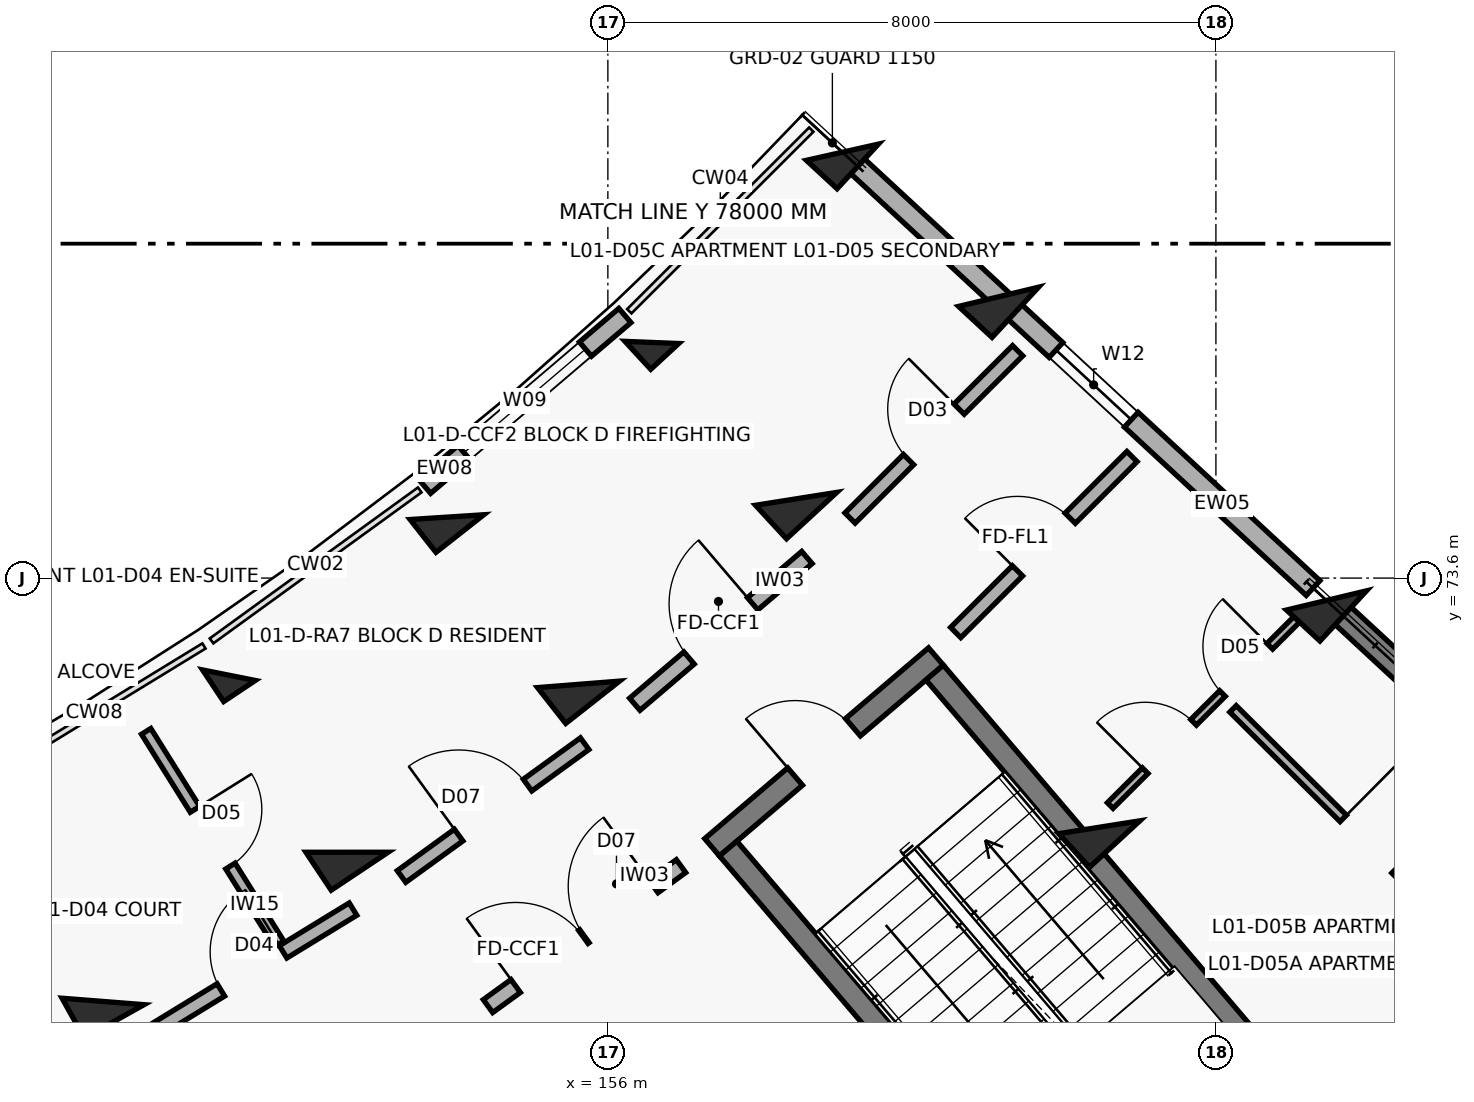
"""IFC4 building model, lengths in metres.
Left out: names, types, materials, properties, quantities, classifications, styles, units other than length and angle.
Written with IfcOpenShell. Run it as: python <this file> out.ifc"""

import sys

from ifc_helpers import new_model, si_unit, direction, frame, frame_2d, origin, origin_2d, place, context, subcontext, project, spatial, rectangle, extrude, element, fill, save


model = new_model("IFC4")
c1 = context("Model", 3, precision=1e-05, world=origin(), true_north=direction((0.0, 1.0)))
c2 = subcontext(c1, "Body", "Model", "MODEL_VIEW")
j1 = project(units=[si_unit("LENGTHUNIT", "METRE"), si_unit("PLANEANGLEUNIT", "RADIAN")], contexts=[c1])
p1 = place(None, origin())
s1 = spatial("IfcSite", under=j1, at=p1, CompositionType="ELEMENT")
p2 = place(p1, origin())
s2 = spatial("IfcBuilding", under=s1, at=p2, CompositionType="ELEMENT")
p3 = place(p2, frame((0.0, 0.0, 4.5)))
s3 = spatial("IfcBuildingStorey", under=s2, at=p3, CompositionType="ELEMENT", Elevation=4.5)
p4 = place(p3, frame((149.358, 68.03, 0.0), z_axis=(0.0, 0.0, 1.0), x_axis=(0.487859659139, -0.87292207727, 0.0)))
e1 = element("IfcColumn", 1, at=p4, inside=s3, PredefinedType="COLUMN", context=c2, shape_type="SweptSolid", body=[
    extrude(rectangle(XDim=0.6, YDim=0.9, at=origin_2d()), origin(), (0.0, 0.0, 1.0), 3.6),
])
p5 = place(p3, frame((151.015, 72.322, 0.0), z_axis=(0.0, 0.0, 1.0), x_axis=(0.554844427448, -0.83195412213, 0.0)))
e2 = element("IfcColumn", 2, at=p5, inside=s3, PredefinedType="COLUMN", context=c2, shape_type="SweptSolid", body=[
    extrude(rectangle(XDim=0.5, YDim=0.5, at=origin_2d()), origin(), (0.0, 0.0, 1.0), 3.6),
])
p6 = place(p3, frame((152.568, 69.993, 0.0), z_axis=(0.0, 0.0, 1.0), x_axis=(0.554844427448, -0.83195412213, 0.0)))
e3 = element("IfcColumn", 3, at=p6, inside=s3, PredefinedType="COLUMN", context=c2, shape_type="SweptSolid", body=[
    extrude(rectangle(XDim=0.6, YDim=0.9, at=origin_2d()), origin(), (0.0, 0.0, 1.0), 3.6),
])
p7 = place(p3, frame((153.883, 74.402, 0.0), z_axis=(0.0, 0.0, 1.0), x_axis=(0.618408395358, -0.785856893175, 0.0)))
e4 = element("IfcColumn", 4, at=p7, inside=s3, PredefinedType="COLUMN", context=c2, shape_type="SweptSolid", body=[
    extrude(rectangle(XDim=0.55, YDim=0.8, at=origin_2d()), origin(), (0.0, 0.0, 1.0), 3.6),
])
for number, where, z_axis, x_axis in (
    (5, (155.614, 72.202, 0.0), (0.0, 0.0, 1.0), (0.618, -0.786, 0.0)),
    (6, (159.25, 67.581, 0.0), (0.0, 0.0, 1.0), (0.618, -0.786, 0.0)),
):
    element("IfcColumn", number, at=place(p3, frame(where, z_axis=z_axis, x_axis=x_axis)), inside=s3, PredefinedType="COLUMN", context=c2, shape_type="SweptSolid", body=[
        extrude(rectangle(XDim=0.6, YDim=0.9, at=origin_2d()), origin(), (0.0, 0.0, 1.0), 3.6),
    ])
p8 = place(p3, frame((156.579, 76.701, 0.0), z_axis=(0.0, 0.0, 1.0), x_axis=(0.678159669868, -0.73491459515, 0.0)))
e7 = element("IfcColumn", 7, at=p8, inside=s3, PredefinedType="COLUMN", context=c2, shape_type="SweptSolid", body=[
    extrude(rectangle(XDim=0.5, YDim=0.5, at=origin_2d()), origin(), (0.0, 0.0, 1.0), 3.6),
])
for number, where, z_axis, x_axis in (
    (8, (158.477, 74.643, 0.0), (0.0, 0.0, 1.0), (0.678, -0.735, 0.0)),
    (9, (162.465, 70.322, 0.0), (0.0, 0.0, 1.0), (0.678, -0.735, 0.0)),
):
    element("IfcColumn", number, at=place(p3, frame(where, z_axis=z_axis, x_axis=x_axis)), inside=s3, PredefinedType="COLUMN", context=c2, shape_type="SweptSolid", body=[
        extrude(rectangle(XDim=0.6, YDim=0.9, at=origin_2d()), origin(), (0.0, 0.0, 1.0), 3.6),
    ])
p9 = place(p3, frame((159.086, 79.204, 0.0), z_axis=(0.0, 0.0, 1.0), x_axis=(0.733729864503, -0.679441304262, 0.0)))
e10 = element("IfcColumn", 10, at=p9, inside=s3, PredefinedType="COLUMN", context=c2, shape_type="SweptSolid", body=[
    extrude(rectangle(XDim=0.55, YDim=0.8, at=origin_2d()), origin(), (0.0, 0.0, 1.0), 3.6),
])
for number, where, z_axis, x_axis in (
    (11, (161.14, 77.301, 0.0), (0.0, 0.0, 1.0), (0.734, -0.679, 0.0)),
    (12, (165.455, 73.306, 0.0), (0.0, 0.0, 1.0), (0.734, -0.679, 0.0)),
):
    element("IfcColumn", number, at=place(p3, frame(where, z_axis=z_axis, x_axis=x_axis)), inside=s3, PredefinedType="COLUMN", context=c2, shape_type="SweptSolid", body=[
        extrude(rectangle(XDim=0.6, YDim=0.9, at=origin_2d()), origin(), (0.0, 0.0, 1.0), 3.6),
    ])
p10 = place(p3, frame((165.587, 73.184, 0.0), z_axis=(0.0, 0.0, 1.0), x_axis=(0.733739663667, -0.679430721974, 0.0)))
e13 = element("IfcWall", 13, at=p10, inside=s3, PredefinedType="SHEAR", context=c2, shape_type="SweptSolid", body=[
    extrude(rectangle(XDim=4.72, YDim=0.31, at=frame_2d((2.36, 0.0))), origin(), (0.0, 0.0, 1.0), 3.36),
])
p11 = place(p3, frame((153.589, 74.808, 0.0), z_axis=(0.0, 0.0, 1.0), x_axis=(0.760985425115, 0.648768974876, 0.0)))
e14 = element("IfcWall", 14, at=p11, inside=s3, PredefinedType="SOLIDWALL", context=c2, shape_type="SweptSolid", body=[
    extrude(rectangle(XDim=3.464, YDim=0.245, at=frame_2d((1.732, 0.0))), origin(), (0.0, 0.0, 1.0), 2.6),
])
p12 = place(p11, frame((0.682, 0.0, 0.32)))
e15 = element("IfcOpeningElement", 15, at=p12, cuts=e14, PredefinedType="OPENING", context=c2, shape_type="SweptSolid", body=[
    extrude(rectangle(XDim=2.1, YDim=1.65, at=frame_2d((1.05, 0.825))), frame((0.0, 0.133, 0.0), z_axis=(0.0, -1.0, 0.0), x_axis=(1.0, 0.0, 0.0)), (0.0, 0.0, 1.0), 0.265),
])
p13 = place(p3, frame((159.262, 79.041, 0.0), z_axis=(0.0, 0.0, 1.0), x_axis=(0.733738684326, -0.679431779595, 0.0)))
e16 = element("IfcWall", 16, at=p13, inside=s3, PredefinedType="SOLIDWALL", context=c2, shape_type="SweptSolid", body=[
    extrude(rectangle(XDim=8.2, YDim=0.265, at=frame_2d((4.1, 0.0))), origin(), (0.0, 0.0, 1.0), 2.58),
])
p14 = place(p13, frame((3.59, 0.0, 0.75)))
e17 = element("IfcOpeningElement", 17, at=p14, cuts=e16, PredefinedType="OPENING", context=c2, shape_type="SweptSolid", body=[
    extrude(rectangle(XDim=1.35, YDim=1.35, at=frame_2d((0.675, 0.675))), frame((0.0, 0.142, 0.0), z_axis=(0.0, -1.0, 0.0), x_axis=(1.0, 0.0, 0.0)), (0.0, 0.0, 1.0), 0.285),
])
p15 = place(p3, frame((157.372, 70.058, 0.0), z_axis=(0.0, 0.0, 1.0), x_axis=(0.760990583254, 0.648762924495, 0.0)))
e18 = element("IfcWall", 18, at=p15, inside=s3, PredefinedType="SHEAR", context=c2, shape_type="SweptSolid", body=[
    extrude(rectangle(XDim=3.87, YDim=0.3, at=frame_2d((1.935, 0.0))), origin(), (0.0, 0.0, 1.0), 3.6),
])
p16 = place(p15, frame((1.435, 0.0, 0.0)))
e19 = element("IfcOpeningElement", 19, at=p16, cuts=e18, PredefinedType="OPENING", context=c2, shape_type="SweptSolid", body=[
    extrude(rectangle(XDim=1.0, YDim=2.15, at=frame_2d((0.5, 1.075))), frame((0.0, 0.16, 0.0), z_axis=(0.0, -1.0, 0.0), x_axis=(1.0, 0.0, 0.0)), (0.0, 0.0, 1.0), 0.32),
])
p17 = place(p3, frame((157.583, 70.041, 0.0), z_axis=(0.0, 0.0, 1.0), x_axis=(0.648762810187, -0.760990680704, 0.0)))
e20 = element("IfcWall", 20, at=p17, inside=s3, PredefinedType="SHEAR", context=c2, shape_type="SweptSolid", body=[
    extrude(rectangle(XDim=7.69, YDim=0.3, at=frame_2d((3.845, 0.0))), origin(), (0.0, 0.0, 1.0), 3.6),
])
p18 = place(p3, frame((160.3, 72.357, 0.0), z_axis=(0.0, 0.0, 1.0), x_axis=(0.648781194888, -0.760975006922, 0.0)))
e21 = element("IfcWall", 21, at=p18, inside=s3, PredefinedType="SHEAR", context=c2, shape_type="SweptSolid", body=[
    extrude(rectangle(XDim=7.69, YDim=0.3, at=frame_2d((3.845, 0.0))), origin(), (0.0, 0.0, 1.0), 3.6),
])
p19 = place(p3, frame((149.989, 67.619, 0.0), z_axis=(0.0, 0.0, 1.0), x_axis=(0.853121049608, 0.5217130195, 0.0)))
e22 = element("IfcWall", 22, at=p19, inside=s3, PredefinedType="SOLIDWALL", context=c2, shape_type="SweptSolid", body=[
    extrude(rectangle(XDim=3.116, YDim=0.19, at=frame_2d((1.558, 0.0))), origin(), (0.0, 0.0, 1.0), 2.58),
])
p20 = place(p19, frame((1.078, 0.0, 0.0)))
e23 = element("IfcOpeningElement", 23, at=p20, cuts=e22, PredefinedType="OPENING", context=c2, shape_type="SweptSolid", body=[
    extrude(rectangle(XDim=0.96, YDim=2.1, at=frame_2d((0.48, 1.05))), frame((0.0, 0.105, 0.0), z_axis=(0.0, -1.0, 0.0), x_axis=(1.0, 0.0, 0.0)), (0.0, 0.0, 1.0), 0.21),
])
p21 = place(p3, frame((149.926, 71.583, 0.0), z_axis=(0.0, 0.0, 1.0), x_axis=(0.5303779416, -0.847761310196, 0.0)))
e24 = element("IfcWall", 24, at=p21, inside=s3, PredefinedType="PARTITIONING", context=c2, shape_type="SweptSolid", body=[
    extrude(rectangle(XDim=3.3, YDim=0.145, at=frame_2d((1.65, 0.0))), origin(), (0.0, 0.0, 1.0), 2.58),
])
p22 = place(p21, frame((1.21, 0.0, 0.0)))
e25 = element("IfcOpeningElement", 25, at=p22, cuts=e24, PredefinedType="OPENING", context=c2, shape_type="SweptSolid", body=[
    extrude(rectangle(XDim=0.88, YDim=2.1, at=frame_2d((0.44, 1.05))), frame((0.0, 0.083, 0.0), z_axis=(0.0, -1.0, 0.0), x_axis=(1.0, 0.0, 0.0)), (0.0, 0.0, 1.0), 0.165),
])
p23 = place(p3, frame((154.423, 67.968, 0.0), z_axis=(0.0, 0.0, 1.0), x_axis=(0.809516127005, 0.587097641043, 0.0)))
e26 = element("IfcWall", 26, at=p23, inside=s3, PredefinedType="SOLIDWALL", context=c2, shape_type="SweptSolid", body=[
    extrude(rectangle(XDim=3.137, YDim=0.21, at=frame_2d((1.569, 0.0))), origin(), (0.0, 0.0, 1.0), 2.58),
])
p24 = place(p23, frame((0.45, 0.0, 0.0)))
e27 = element("IfcOpeningElement", 27, at=p24, cuts=e26, PredefinedType="OPENING", context=c2, shape_type="SweptSolid", body=[
    extrude(rectangle(XDim=1.1, YDim=2.15, at=frame_2d((0.55, 1.075))), frame((0.0, 0.115, 0.0), z_axis=(0.0, -1.0, 0.0), x_axis=(1.0, 0.0, 0.0)), (0.0, 0.0, 1.0), 0.23),
])
p25 = place(p23, frame((1.567, 0.0, 0.0)))
e28 = element("IfcOpeningElement", 28, at=p25, cuts=e26, PredefinedType="OPENING", context=c2, shape_type="SweptSolid", body=[
    extrude(rectangle(XDim=1.12, YDim=2.15, at=frame_2d((0.56, 1.075))), frame((0.0, 0.115, 0.0), z_axis=(0.0, -1.0, 0.0), x_axis=(1.0, 0.0, 0.0)), (0.0, 0.0, 1.0), 0.23),
])
p26 = place(p3, frame((153.285, 69.674, 0.0), z_axis=(0.0, 0.0, 1.0), x_axis=(0.809505174959, 0.587112741911, 0.0)))
e29 = element("IfcWall", 29, at=p26, inside=s3, PredefinedType="SOLIDWALL", context=c2, shape_type="SweptSolid", body=[
    extrude(rectangle(XDim=2.976, YDim=0.19, at=frame_2d((1.488, 0.0))), origin(), (0.0, 0.0, 1.0), 2.58),
])
p27 = place(p26, frame((0.928, 0.0, 0.0)))
e30 = element("IfcOpeningElement", 30, at=p27, cuts=e29, PredefinedType="OPENING", context=c2, shape_type="SweptSolid", body=[
    extrude(rectangle(XDim=1.12, YDim=2.15, at=frame_2d((0.56, 1.075))), frame((0.0, 0.105, 0.0), z_axis=(0.0, -1.0, 0.0), x_axis=(1.0, 0.0, 0.0)), (0.0, 0.0, 1.0), 0.21),
])
p28 = place(p3, frame((156.354, 71.94, 0.0), z_axis=(0.0, 0.0, 1.0), x_axis=(0.760991187621, 0.648762215579, 0.0)))
e31 = element("IfcWall", 31, at=p28, inside=s3, PredefinedType="SOLIDWALL", context=c2, shape_type="SweptSolid", body=[
    extrude(rectangle(XDim=2.976, YDim=0.21, at=frame_2d((1.488, 0.0))), origin(), (0.0, 0.0, 1.0), 2.58),
])
p29 = place(p28, frame((0.938, 0.0, 0.0)))
e32 = element("IfcOpeningElement", 32, at=p29, cuts=e31, PredefinedType="OPENING", context=c2, shape_type="SweptSolid", body=[
    extrude(rectangle(XDim=1.1, YDim=2.15, at=frame_2d((0.55, 1.075))), frame((0.0, 0.115, 0.0), z_axis=(0.0, -1.0, 0.0), x_axis=(1.0, 0.0, 0.0)), (0.0, 0.0, 1.0), 0.23),
])
p30 = place(p3, frame((160.576, 72.884, 0.0), z_axis=(0.0, 0.0, 1.0), x_axis=(0.70773973846, 0.706473256822, 0.0)))
e33 = element("IfcWall", 33, at=p30, inside=s3, PredefinedType="SOLIDWALL", context=c2, shape_type="SweptSolid", body=[
    extrude(rectangle(XDim=3.277, YDim=0.19, at=frame_2d((1.639, 0.0))), origin(), (0.0, 0.0, 1.0), 2.58),
])
p31 = place(p30, frame((1.148, 0.0, 0.0)))
e34 = element("IfcOpeningElement", 34, at=p31, cuts=e33, PredefinedType="OPENING", context=c2, shape_type="SweptSolid", body=[
    extrude(rectangle(XDim=0.98, YDim=2.15, at=frame_2d((0.49, 1.075))), frame((0.0, 0.105, 0.0), z_axis=(0.0, -1.0, 0.0), x_axis=(1.0, 0.0, 0.0)), (0.0, 0.0, 1.0), 0.21),
])
p32 = place(p3, frame((159.186, 74.39, 0.0), z_axis=(0.0, 0.0, 1.0), x_axis=(0.70773330139, 0.706479705373, 0.0)))
e35 = element("IfcWall", 35, at=p32, inside=s3, PredefinedType="SOLIDWALL", context=c2, shape_type="SweptSolid", body=[
    extrude(rectangle(XDim=3.116, YDim=0.19, at=frame_2d((1.558, 0.0))), origin(), (0.0, 0.0, 1.0), 2.58),
])
p33 = place(p32, frame((1.088, 0.0, 0.0)))
e36 = element("IfcOpeningElement", 36, at=p33, cuts=e35, PredefinedType="OPENING", context=c2, shape_type="SweptSolid", body=[
    extrude(rectangle(XDim=0.94, YDim=2.1, at=frame_2d((0.47, 1.05))), frame((0.0, 0.105, 0.0), z_axis=(0.0, -1.0, 0.0), x_axis=(1.0, 0.0, 0.0)), (0.0, 0.0, 1.0), 0.21),
])
p34 = place(p3, frame((162.609, 70.607, 0.0), z_axis=(0.0, 0.0, 1.0), x_axis=(0.707714058013, 0.70649898237, 0.0)))
e37 = element("IfcWall", 37, at=p34, inside=s3, PredefinedType="PARTITIONING", context=c2, shape_type="SweptSolid", body=[
    extrude(rectangle(XDim=3.617, YDim=0.105, at=frame_2d((1.808, 0.0))), origin(), (0.0, 0.0, 1.0), 2.58),
])
p35 = place(p34, frame((0.65, 0.0, 0.0)))
e38 = element("IfcOpeningElement", 38, at=p35, cuts=e37, PredefinedType="OPENING", context=c2, shape_type="SweptSolid", body=[
    extrude(rectangle(XDim=0.9, YDim=2.1, at=frame_2d((0.45, 1.05))), frame((0.0, 0.062, 0.0), z_axis=(0.0, -1.0, 0.0), x_axis=(1.0, 0.0, 0.0)), (0.0, 0.0, 1.0), 0.125),
])
p36 = place(p34, frame((2.086, 0.0, 0.0)))
e39 = element("IfcOpeningElement", 39, at=p36, cuts=e37, PredefinedType="OPENING", context=c2, shape_type="SweptSolid", body=[
    extrude(rectangle(XDim=0.88, YDim=2.1, at=frame_2d((0.44, 1.05))), frame((0.0, 0.062, 0.0), z_axis=(0.0, -1.0, 0.0), x_axis=(1.0, 0.0, 0.0)), (0.0, 0.0, 1.0), 0.125),
])
p37 = place(p3, frame((164.225, 71.879, 0.0), z_axis=(0.0, 0.0, 1.0), x_axis=(0.709543935341, -0.704661197897, 0.0)))
e40 = element("IfcWall", 40, at=p37, inside=s3, PredefinedType="PARTITIONING", context=c2, shape_type="SweptSolid", body=[
    extrude(rectangle(XDim=5.05, YDim=0.12, at=frame_2d((2.525, 0.0))), origin(), (0.0, 0.0, 1.0), 2.58),
])
p38 = place(p37, frame((2.045, 0.0, 0.0)))
e41 = element("IfcOpeningElement", 41, at=p38, cuts=e40, PredefinedType="OPENING", context=c2, shape_type="SweptSolid", body=[
    extrude(rectangle(XDim=0.96, YDim=2.1, at=frame_2d((0.48, 1.05))), frame((0.0, 0.07, 0.0), z_axis=(0.0, -1.0, 0.0), x_axis=(1.0, 0.0, 0.0)), (0.0, 0.0, 1.0), 0.14),
])
p39 = place(p12, origin())
e42 = element("IfcWindow", 42, at=p39, inside=s3, PartitioningType="TRIPLE_PANEL_VERTICAL", PredefinedType="WINDOW", context=c2, shape_type="SweptSolid", body=[
    extrude(rectangle(XDim=2.1, YDim=1.65, at=frame_2d((1.05, 0.825))), frame((0.0, 0.03, 0.0), z_axis=(0.0, -1.0, 0.0), x_axis=(1.0, 0.0, 0.0)), (0.0, 0.0, 1.0), 0.06),
])
fill(e15, e42)
p40 = place(p14, origin())
e43 = element("IfcWindow", 43, at=p40, inside=s3, PartitioningType="DOUBLE_PANEL_VERTICAL", PredefinedType="WINDOW", context=c2, shape_type="SweptSolid", body=[
    extrude(rectangle(XDim=1.35, YDim=1.35, at=frame_2d((0.675, 0.675))), frame((0.0, 0.03, 0.0), z_axis=(0.0, -1.0, 0.0), x_axis=(1.0, 0.0, 0.0)), (0.0, 0.0, 1.0), 0.06),
])
fill(e17, e43)
p41 = place(p16, origin())
e44 = element("IfcDoor", 44, at=p41, inside=s3, OperationType="SINGLE_SWING_LEFT", PredefinedType="DOOR", context=c2, shape_type="SweptSolid", body=[
    extrude(rectangle(XDim=1.0, YDim=2.15, at=frame_2d((0.5, 1.075))), frame((0.0, 0.025, 0.0), z_axis=(0.0, -1.0, 0.0), x_axis=(1.0, 0.0, 0.0)), (0.0, 0.0, 1.0), 0.05),
])
fill(e19, e44)
p42 = place(p20, origin())
e45 = element("IfcDoor", 45, at=p42, inside=s3, OperationType="SINGLE_SWING_RIGHT", PredefinedType="DOOR", context=c2, shape_type="SweptSolid", body=[
    extrude(rectangle(XDim=0.96, YDim=2.1, at=frame_2d((0.48, 1.05))), frame((0.0, 0.025, 0.0), z_axis=(0.0, -1.0, 0.0), x_axis=(1.0, 0.0, 0.0)), (0.0, 0.0, 1.0), 0.05),
])
fill(e23, e45)
p43 = place(p22, origin())
e46 = element("IfcDoor", 46, at=p43, inside=s3, OperationType="SINGLE_SWING_LEFT", PredefinedType="DOOR", context=c2, shape_type="SweptSolid", body=[
    extrude(rectangle(XDim=0.88, YDim=2.1, at=frame_2d((0.44, 1.05))), frame((0.0, 0.025, 0.0), z_axis=(0.0, -1.0, 0.0), x_axis=(1.0, 0.0, 0.0)), (0.0, 0.0, 1.0), 0.05),
])
fill(e25, e46)
p44 = place(p24, origin())
e47 = element("IfcDoor", 47, at=p44, inside=s3, OperationType="SINGLE_SWING_LEFT", PredefinedType="DOOR", context=c2, shape_type="SweptSolid", body=[
    extrude(rectangle(XDim=1.1, YDim=2.15, at=frame_2d((0.55, 1.075))), frame((0.0, 0.025, 0.0), z_axis=(0.0, -1.0, 0.0), x_axis=(1.0, 0.0, 0.0)), (0.0, 0.0, 1.0), 0.05),
])
fill(e27, e47)
p45 = place(p25, origin())
e48 = element("IfcDoor", 48, at=p45, inside=s3, OperationType="SINGLE_SWING_RIGHT", PredefinedType="DOOR", context=c2, shape_type="SweptSolid", body=[
    extrude(rectangle(XDim=1.12, YDim=2.15, at=frame_2d((0.56, 1.075))), frame((0.0, 0.025, 0.0), z_axis=(0.0, -1.0, 0.0), x_axis=(1.0, 0.0, 0.0)), (0.0, 0.0, 1.0), 0.05),
])
fill(e28, e48)
p46 = place(p27, origin())
e49 = element("IfcDoor", 49, at=p46, inside=s3, OperationType="SINGLE_SWING_LEFT", PredefinedType="DOOR", context=c2, shape_type="SweptSolid", body=[
    extrude(rectangle(XDim=1.12, YDim=2.15, at=frame_2d((0.56, 1.075))), frame((0.0, 0.025, 0.0), z_axis=(0.0, -1.0, 0.0), x_axis=(1.0, 0.0, 0.0)), (0.0, 0.0, 1.0), 0.05),
])
fill(e30, e49)
p47 = place(p29, origin())
e50 = element("IfcDoor", 50, at=p47, inside=s3, OperationType="SINGLE_SWING_RIGHT", PredefinedType="DOOR", context=c2, shape_type="SweptSolid", body=[
    extrude(rectangle(XDim=1.1, YDim=2.15, at=frame_2d((0.55, 1.075))), frame((0.0, 0.025, 0.0), z_axis=(0.0, -1.0, 0.0), x_axis=(1.0, 0.0, 0.0)), (0.0, 0.0, 1.0), 0.05),
])
fill(e32, e50)
p48 = place(p31, origin())
e51 = element("IfcDoor", 51, at=p48, inside=s3, OperationType="SINGLE_SWING_LEFT", PredefinedType="DOOR", context=c2, shape_type="SweptSolid", body=[
    extrude(rectangle(XDim=0.98, YDim=2.15, at=frame_2d((0.49, 1.075))), frame((0.0, 0.025, 0.0), z_axis=(0.0, -1.0, 0.0), x_axis=(1.0, 0.0, 0.0)), (0.0, 0.0, 1.0), 0.05),
])
fill(e34, e51)
p49 = place(p33, origin())
e52 = element("IfcDoor", 52, at=p49, inside=s3, OperationType="SINGLE_SWING_RIGHT", PredefinedType="DOOR", context=c2, shape_type="SweptSolid", body=[
    extrude(rectangle(XDim=0.94, YDim=2.1, at=frame_2d((0.47, 1.05))), frame((0.0, 0.025, 0.0), z_axis=(0.0, -1.0, 0.0), x_axis=(1.0, 0.0, 0.0)), (0.0, 0.0, 1.0), 0.05),
])
fill(e36, e52)
p50 = place(p35, origin())
e53 = element("IfcDoor", 53, at=p50, inside=s3, OperationType="SINGLE_SWING_LEFT", PredefinedType="DOOR", context=c2, shape_type="SweptSolid", body=[
    extrude(rectangle(XDim=0.9, YDim=2.1, at=frame_2d((0.45, 1.05))), frame((0.0, 0.025, 0.0), z_axis=(0.0, -1.0, 0.0), x_axis=(1.0, 0.0, 0.0)), (0.0, 0.0, 1.0), 0.05),
])
fill(e38, e53)
p51 = place(p36, origin())
e54 = element("IfcDoor", 54, at=p51, inside=s3, OperationType="SINGLE_SWING_RIGHT", PredefinedType="DOOR", context=c2, shape_type="SweptSolid", body=[
    extrude(rectangle(XDim=0.88, YDim=2.1, at=frame_2d((0.44, 1.05))), frame((0.0, 0.025, 0.0), z_axis=(0.0, -1.0, 0.0), x_axis=(1.0, 0.0, 0.0)), (0.0, 0.0, 1.0), 0.05),
])
fill(e39, e54)
p52 = place(p38, origin())
e55 = element("IfcDoor", 55, at=p52, inside=s3, OperationType="SINGLE_SWING_LEFT", PredefinedType="DOOR", context=c2, shape_type="SweptSolid", body=[
    extrude(rectangle(XDim=0.96, YDim=2.1, at=frame_2d((0.48, 1.05))), frame((0.0, 0.025, 0.0), z_axis=(0.0, -1.0, 0.0), x_axis=(1.0, 0.0, 0.0)), (0.0, 0.0, 1.0), 0.05),
])
fill(e41, e55)
save(model, sys.argv[1])
